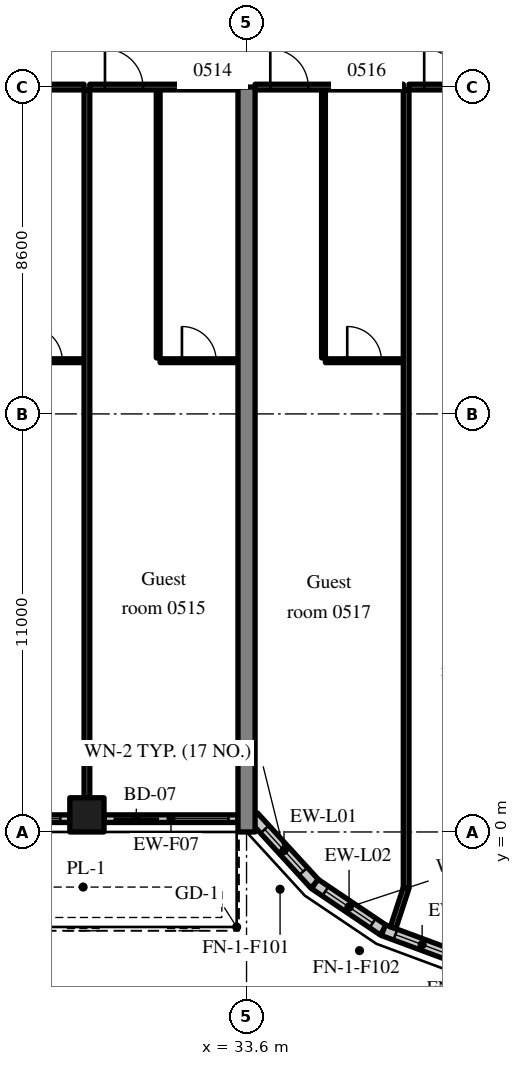
"""IFC4 building model, lengths in metres.
Left out: names, types, materials, properties, quantities, classifications, styles, units other than length and angle.
Written with IfcOpenShell. Run it as: python <this file> out.ifc"""

import sys

from ifc_helpers import new_model, si_unit, direction, frame, frame_2d, origin, origin_2d, place, context, subcontext, project, spatial, rectangle, extrude, source, transform, mapped, element, fill, save


model = new_model("IFC4")
c1 = context("Model", 3, precision=1e-05, world=origin(), true_north=direction((0.0, 1.0)))
c2 = subcontext(c1, "Body", "Model", "MODEL_VIEW")
j1 = project(units=[si_unit("LENGTHUNIT", "METRE"), si_unit("PLANEANGLEUNIT", "RADIAN")], contexts=[c1])
p1 = place(None, origin())
s1 = spatial("IfcSite", under=j1, at=p1, CompositionType="ELEMENT")
p2 = place(p1, origin())
s2 = spatial("IfcBuilding", under=s1, at=p2, CompositionType="ELEMENT")
p3 = place(p2, frame((0.0, 0.0, 27.8)))
s3 = spatial("IfcBuildingStorey", under=s2, at=p3, CompositionType="ELEMENT", Elevation=27.8)
m1 = source(origin(), c2, "Body", "SweptSolid", [
    extrude(rectangle(XDim=19.6, YDim=0.45, at=frame_2d((9.8, 0.0))), origin(), (0.0, 0.0, 1.0), 3.52),
])
p4 = place(p3, frame((33.6, 0.0, 0.0), z_axis=(0.0, 0.0, 1.0), x_axis=(0.0, 1.0, 0.0)))
e1 = element("IfcWall", 1, at=p4, inside=s3, PredefinedType="SHEAR", context=c2, shape_type="MappedRepresentation", body=[
    mapped(m1, transform((0.0, 0.0, 0.0), scale=1.0)),
])
m2 = source(origin(), c2, "Body", "SweptSolid", [
    extrude(rectangle(XDim=0.9, YDim=0.9, at=origin_2d()), origin(), (0.0, 0.0, 1.0), 3.52),
])
p5 = place(p3, frame((29.4, 0.45, 0.0), z_axis=(0.0, 0.0, 1.0), x_axis=(1.0, 0.0, 0.0)))
e2 = element("IfcColumn", 2, at=p5, inside=s3, PredefinedType="COLUMN", context=c2, shape_type="MappedRepresentation", body=[
    mapped(m2, transform((0.0, 0.0, 0.0), scale=1.0)),
])
m3 = source(origin(), c2, "Body", "SweptSolid", [
    extrude(rectangle(XDim=3.525, YDim=0.2, at=frame_2d((1.762, 0.0))), origin(), (0.0, 0.0, 1.0), 2.77),
])
p6 = place(p3, frame((25.425, 0.35, 0.0), z_axis=(0.0, 0.0, 1.0), x_axis=(1.0, 0.0, 0.0)))
e3 = element("IfcWall", 3, at=p6, inside=s3, PredefinedType="SOLIDWALL", context=c2, shape_type="MappedRepresentation", body=[
    mapped(m3, transform((0.0, 0.0, 0.0), scale=1.0)),
])
m4 = source(origin(), c2, "Body", "SweptSolid", [
    extrude(rectangle(XDim=1.2, YDim=2.4, at=frame_2d((0.6, 1.2))), frame((0.0, 0.11, 0.0), z_axis=(0.0, -1.0, 0.0), x_axis=(1.0, 0.0, 0.0)), (0.0, 0.0, 1.0), 0.22),
])
p7 = place(p6, frame((0.25, 0.0, 0.0)))
e4 = element("IfcOpeningElement", 4, at=p7, cuts=e3, PredefinedType="OPENING", context=c2, shape_type="MappedRepresentation", body=[
    mapped(m4, transform((0.0, 0.0, 0.0), scale=1.0)),
])
m5 = source(origin(), c2, "Body", "SweptSolid", [
    extrude(rectangle(XDim=1.5, YDim=1.5, at=frame_2d((0.75, 0.75))), frame((0.0, 0.11, 0.0), z_axis=(0.0, -1.0, 0.0), x_axis=(1.0, 0.0, 0.0)), (0.0, 0.0, 1.0), 0.22),
])
p8 = place(p6, frame((1.775, 0.0, 0.9)))
e5 = element("IfcOpeningElement", 5, at=p8, cuts=e3, PredefinedType="OPENING", context=c2, shape_type="MappedRepresentation", body=[
    mapped(m5, transform((0.0, 0.0, 0.0), scale=1.0)),
])
p9 = place(p3, frame((29.85, 0.35, 0.0), z_axis=(0.0, 0.0, 1.0), x_axis=(1.0, 0.0, 0.0)))
e6 = element("IfcWall", 6, at=p9, inside=s3, PredefinedType="SOLIDWALL", context=c2, shape_type="MappedRepresentation", body=[
    mapped(m3, transform((0.0, 0.0, 0.0), scale=1.0)),
])
p10 = place(p9, frame((0.25, 0.0, 0.0)))
e7 = element("IfcOpeningElement", 7, at=p10, cuts=e6, PredefinedType="OPENING", context=c2, shape_type="MappedRepresentation", body=[
    mapped(m4, transform((0.0, 0.0, 0.0), scale=1.0)),
])
p11 = place(p9, frame((1.775, 0.0, 0.9)))
e8 = element("IfcOpeningElement", 8, at=p11, cuts=e6, PredefinedType="OPENING", context=c2, shape_type="MappedRepresentation", body=[
    mapped(m5, transform((0.0, 0.0, 0.0), scale=1.0)),
])
m6 = source(origin(), c2, "Body", "SweptSolid", [
    extrude(rectangle(XDim=2.398, YDim=0.3, at=frame_2d((1.199, 0.0))), origin(), (0.0, 0.0, 1.0), 3.52),
])
p12 = place(p3, frame((33.776, 0.4, 0.0), z_axis=(0.0, 0.0, 1.0), x_axis=(0.675374189419, -0.737475222815, 0.0)))
e9 = element("IfcWall", 9, at=p12, inside=s3, PredefinedType="SOLIDWALL", context=c2, shape_type="MappedRepresentation", body=[
    mapped(m6, transform((0.0, 0.0, 0.0), scale=1.0)),
])
m7 = source(origin(), c2, "Body", "SweptSolid", [
    extrude(rectangle(XDim=1.5, YDim=2.0, at=frame_2d((0.75, 1.0))), frame((0.0, 0.16, 0.0), z_axis=(0.0, -1.0, 0.0), x_axis=(1.0, 0.0, 0.0)), (0.0, 0.0, 1.0), 0.32),
])
p13 = place(p12, frame((0.449, 0.0, 0.9)))
e10 = element("IfcOpeningElement", 10, at=p13, cuts=e9, PredefinedType="OPENING", context=c2, shape_type="MappedRepresentation", body=[
    mapped(m7, transform((0.0, 0.0, 0.0), scale=1.0)),
])
m8 = source(origin(), c2, "Body", "SweptSolid", [
    extrude(rectangle(XDim=2.176, YDim=0.3, at=frame_2d((1.088, 0.0))), origin(), (0.0, 0.0, 1.0), 3.52),
])
p14 = place(p3, frame((35.396, -1.369, 0.0), z_axis=(0.0, 0.0, 1.0), x_axis=(0.829590746428, -0.558371913192, 0.0)))
e11 = element("IfcWall", 11, at=p14, inside=s3, PredefinedType="SOLIDWALL", context=c2, shape_type="MappedRepresentation", body=[
    mapped(m8, transform((0.0, 0.0, 0.0), scale=1.0)),
])
p15 = place(p14, frame((0.338, 0.0, 0.9)))
e12 = element("IfcOpeningElement", 12, at=p15, cuts=e11, PredefinedType="OPENING", context=c2, shape_type="MappedRepresentation", body=[
    mapped(m7, transform((0.0, 0.0, 0.0), scale=1.0)),
])
p16 = place(p3, frame((37.201, -2.583, 0.0), z_axis=(0.0, 0.0, 1.0), x_axis=(0.93754555999, -0.347862505801, 0.0)))
e13 = element("IfcWall", 13, at=p16, inside=s3, PredefinedType="SOLIDWALL", context=c2, shape_type="MappedRepresentation", body=[
    mapped(m8, transform((0.0, 0.0, 0.0), scale=1.0)),
])
p17 = place(p16, frame((0.338, 0.0, 0.9)))
e14 = element("IfcOpeningElement", 14, at=p17, cuts=e13, PredefinedType="OPENING", context=c2, shape_type="MappedRepresentation", body=[
    mapped(m7, transform((0.0, 0.0, 0.0), scale=1.0)),
])
m9 = source(origin(), c2, "Body", "SweptSolid", [
    extrude(rectangle(XDim=2.05, YDim=0.1, at=frame_2d((1.025, 0.0))), origin(), (0.0, 0.0, 1.0), 3.52),
])
p18 = place(p3, frame((27.275, 12.4, 0.0), z_axis=(0.0, 0.0, 1.0), x_axis=(1.0, 0.0, 0.0)))
e15 = element("IfcWall", 15, at=p18, inside=s3, PredefinedType="PARTITIONING", context=c2, shape_type="MappedRepresentation", body=[
    mapped(m9, transform((0.0, 0.0, 0.0), scale=1.0)),
])
m10 = source(origin(), c2, "Body", "SweptSolid", [
    extrude(rectangle(XDim=0.9, YDim=2.1, at=frame_2d((0.45, 1.05))), frame((0.0, 0.06, 0.0), z_axis=(0.0, -1.0, 0.0), x_axis=(1.0, 0.0, 0.0)), (0.0, 0.0, 1.0), 0.12),
])
p19 = place(p18, frame((0.575, 0.0, 0.0)))
e16 = element("IfcOpeningElement", 16, at=p19, cuts=e15, PredefinedType="OPENING", context=c2, shape_type="MappedRepresentation", body=[
    mapped(m10, transform((0.0, 0.0, 0.0), scale=1.0)),
])
m11 = source(origin(), c2, "Body", "SweptSolid", [
    extrude(rectangle(XDim=3.9, YDim=0.15, at=frame_2d((1.95, 0.0))), origin(), (0.0, 0.0, 1.0), 2.82),
])
p20 = place(p3, frame((25.425, 19.6, 0.0), z_axis=(0.0, 0.0, 1.0), x_axis=(1.0, 0.0, 0.0)))
e17 = element("IfcWall", 17, at=p20, inside=s3, PredefinedType="PARTITIONING", context=c2, shape_type="MappedRepresentation", body=[
    mapped(m11, transform((0.0, 0.0, 0.0), scale=1.0)),
])
m12 = source(origin(), c2, "Body", "SweptSolid", [
    extrude(rectangle(XDim=1.0, YDim=2.1, at=frame_2d((0.5, 1.05))), frame((0.0, 0.085, 0.0), z_axis=(0.0, -1.0, 0.0), x_axis=(1.0, 0.0, 0.0)), (0.0, 0.0, 1.0), 0.17),
])
p21 = place(p20, frame((0.4, 0.0, 0.0)))
e18 = element("IfcOpeningElement", 18, at=p21, cuts=e17, PredefinedType="OPENING", context=c2, shape_type="MappedRepresentation", body=[
    mapped(m12, transform((0.0, 0.0, 0.0), scale=1.0)),
])
m13 = source(origin(), c2, "Body", "SweptSolid", [
    extrude(rectangle(XDim=7.05, YDim=0.1, at=frame_2d((3.525, 0.0))), origin(), (0.0, 0.0, 1.0), 3.52),
])
p22 = place(p3, frame((31.275, 12.475, 0.0), z_axis=(0.0, 0.0, 1.0), x_axis=(0.0, 1.0, 0.0)))
e19 = element("IfcWall", 19, at=p22, inside=s3, PredefinedType="PARTITIONING", context=c2, shape_type="MappedRepresentation", body=[
    mapped(m13, transform((0.0, 0.0, 0.0), scale=1.0)),
])
p23 = place(p3, frame((31.325, 12.4, 0.0), z_axis=(0.0, 0.0, 1.0), x_axis=(1.0, 0.0, 0.0)))
e20 = element("IfcWall", 20, at=p23, inside=s3, PredefinedType="PARTITIONING", context=c2, shape_type="MappedRepresentation", body=[
    mapped(m9, transform((0.0, 0.0, 0.0), scale=1.0)),
])
p24 = place(p23, frame((0.575, 0.0, 0.0)))
e21 = element("IfcOpeningElement", 21, at=p24, cuts=e20, PredefinedType="OPENING", context=c2, shape_type="MappedRepresentation", body=[
    mapped(m10, transform((0.0, 0.0, 0.0), scale=1.0)),
])
p25 = place(p3, frame((29.475, 19.6, 0.0), z_axis=(0.0, 0.0, 1.0), x_axis=(1.0, 0.0, 0.0)))
e22 = element("IfcWall", 22, at=p25, inside=s3, PredefinedType="PARTITIONING", context=c2, shape_type="MappedRepresentation", body=[
    mapped(m11, transform((0.0, 0.0, 0.0), scale=1.0)),
])
p26 = place(p25, frame((0.4, 0.0, 0.0)))
e23 = element("IfcOpeningElement", 23, at=p26, cuts=e22, PredefinedType="OPENING", context=c2, shape_type="MappedRepresentation", body=[
    mapped(m12, transform((0.0, 0.0, 0.0), scale=1.0)),
])
m14 = source(origin(), c2, "Body", "SweptSolid", [
    extrude(rectangle(XDim=18.625, YDim=0.15, at=frame_2d((9.312, 0.0))), origin(), (0.0, 0.0, 1.0), 3.52),
])
p27 = place(p3, frame((29.4, 0.9, 0.0), z_axis=(0.0, 0.0, 1.0), x_axis=(0.0, 1.0, 0.0)))
e24 = element("IfcWall", 24, at=p27, inside=s3, PredefinedType="PARTITIONING", context=c2, shape_type="MappedRepresentation", body=[
    mapped(m14, transform((0.0, 0.0, 0.0), scale=1.0)),
])
p28 = place(p3, frame((35.625, 12.475, 0.0), z_axis=(0.0, 0.0, 1.0), x_axis=(0.0, 1.0, 0.0)))
e25 = element("IfcWall", 25, at=p28, inside=s3, PredefinedType="PARTITIONING", context=c2, shape_type="MappedRepresentation", body=[
    mapped(m13, transform((0.0, 0.0, 0.0), scale=1.0)),
])
p29 = place(p3, frame((35.675, 12.4, 0.0), z_axis=(0.0, 0.0, 1.0), x_axis=(1.0, 0.0, 0.0)))
e26 = element("IfcWall", 26, at=p29, inside=s3, PredefinedType="PARTITIONING", context=c2, shape_type="MappedRepresentation", body=[
    mapped(m9, transform((0.0, 0.0, 0.0), scale=1.0)),
])
p30 = place(p29, frame((0.575, 0.0, 0.0)))
e27 = element("IfcOpeningElement", 27, at=p30, cuts=e26, PredefinedType="OPENING", context=c2, shape_type="MappedRepresentation", body=[
    mapped(m10, transform((0.0, 0.0, 0.0), scale=1.0)),
])
m15 = source(origin(), c2, "Body", "SweptSolid", [
    extrude(rectangle(XDim=3.9, YDim=0.15, at=frame_2d((1.95, 0.0))), origin(), (0.0, 0.0, 1.0), 2.82),
])
p31 = place(p3, frame((33.825, 19.6, 0.0), z_axis=(0.0, 0.0, 1.0), x_axis=(1.0, 0.0, 0.0)))
e28 = element("IfcWall", 28, at=p31, inside=s3, PredefinedType="PARTITIONING", context=c2, shape_type="MappedRepresentation", body=[
    mapped(m15, transform((0.0, 0.0, 0.0), scale=1.0)),
])
p32 = place(p31, frame((0.4, 0.0, 0.0)))
e29 = element("IfcOpeningElement", 29, at=p32, cuts=e28, PredefinedType="OPENING", context=c2, shape_type="MappedRepresentation", body=[
    mapped(m12, transform((0.0, 0.0, 0.0), scale=1.0)),
])
p33 = place(p3, frame((37.875, 19.6, 0.0), z_axis=(0.0, 0.0, 1.0), x_axis=(1.0, 0.0, 0.0)))
e30 = element("IfcWall", 30, at=p33, inside=s3, PredefinedType="PARTITIONING", context=c2, shape_type="MappedRepresentation", body=[
    mapped(m11, transform((0.0, 0.0, 0.0), scale=1.0)),
])
p34 = place(p33, frame((0.4, 0.0, 0.0)))
e31 = element("IfcOpeningElement", 31, at=p34, cuts=e30, PredefinedType="OPENING", context=c2, shape_type="MappedRepresentation", body=[
    mapped(m12, transform((0.0, 0.0, 0.0), scale=1.0)),
])
m16 = source(origin(), c2, "Body", "SweptSolid", [
    extrude(rectangle(XDim=20.998, YDim=0.15, at=frame_2d((10.499, 0.0))), origin(), (0.0, 0.0, 1.0), 3.52),
])
p35 = place(p3, frame((37.8, -1.473, 0.0), z_axis=(0.0, 0.0, 1.0), x_axis=(0.0, 1.0, 0.0)))
e32 = element("IfcWall", 32, at=p35, inside=s3, PredefinedType="PARTITIONING", context=c2, shape_type="MappedRepresentation", body=[
    mapped(m16, transform((0.0, 0.0, 0.0), scale=1.0)),
])
m17 = source(origin(), c2, "Body", "SweptSolid", [
    extrude(rectangle(XDim=1.101, YDim=0.15, at=frame_2d((0.55, 0.0))), origin(), (0.0, 0.0, 1.0), 3.52),
])
p36 = place(p3, frame((37.457, -2.519, 0.0), z_axis=(0.0, 0.0, 1.0), x_axis=(0.311567081539, 0.950224159712, 0.0)))
e33 = element("IfcWall", 33, at=p36, inside=s3, PredefinedType="PARTITIONING", context=c2, shape_type="MappedRepresentation", body=[
    mapped(m17, transform((0.0, 0.0, 0.0), scale=1.0)),
])
m18 = source(origin(), c2, "Body", "SweptSolid", [
    extrude(rectangle(XDim=1.5, YDim=1.5, at=frame_2d((0.75, 0.75))), frame((0.0, 0.03, 0.0), z_axis=(0.0, -1.0, 0.0), x_axis=(1.0, 0.0, 0.0)), (0.0, 0.0, 1.0), 0.06),
])
p37 = place(p8, origin())
e34 = element("IfcWindow", 34, at=p37, inside=s3, PartitioningType="SINGLE_PANEL", PredefinedType="WINDOW", context=c2, shape_type="MappedRepresentation", body=[
    mapped(m18, transform((0.0, 0.0, 0.0), scale=1.0)),
])
fill(e5, e34)
m19 = source(origin(), c2, "Body", "SweptSolid", [
    extrude(rectangle(XDim=1.2, YDim=2.4, at=frame_2d((0.6, 1.2))), frame((0.0, 0.025, 0.0), z_axis=(0.0, -1.0, 0.0), x_axis=(1.0, 0.0, 0.0)), (0.0, 0.0, 1.0), 0.05),
])
p38 = place(p10, origin())
e35 = element("IfcDoor", 35, at=p38, inside=s3, OperationType="SLIDING_TO_LEFT", PredefinedType="DOOR", context=c2, shape_type="MappedRepresentation", body=[
    mapped(m19, transform((0.0, 0.0, 0.0), scale=1.0)),
])
fill(e7, e35)
p39 = place(p11, origin())
e36 = element("IfcWindow", 36, at=p39, inside=s3, PartitioningType="SINGLE_PANEL", PredefinedType="WINDOW", context=c2, shape_type="MappedRepresentation", body=[
    mapped(m18, transform((0.0, 0.0, 0.0), scale=1.0)),
])
fill(e8, e36)
m20 = source(origin(), c2, "Body", "SweptSolid", [
    extrude(rectangle(XDim=1.5, YDim=2.0, at=frame_2d((0.75, 1.0))), frame((0.0, 0.03, 0.0), z_axis=(0.0, -1.0, 0.0), x_axis=(1.0, 0.0, 0.0)), (0.0, 0.0, 1.0), 0.06),
])
p40 = place(p13, origin())
e37 = element("IfcWindow", 37, at=p40, inside=s3, PartitioningType="SINGLE_PANEL", PredefinedType="WINDOW", context=c2, shape_type="MappedRepresentation", body=[
    mapped(m20, transform((0.0, 0.0, 0.0), scale=1.0)),
])
fill(e10, e37)
p41 = place(p15, origin())
e38 = element("IfcWindow", 38, at=p41, inside=s3, PartitioningType="SINGLE_PANEL", PredefinedType="WINDOW", context=c2, shape_type="MappedRepresentation", body=[
    mapped(m20, transform((0.0, 0.0, 0.0), scale=1.0)),
])
fill(e12, e38)
p42 = place(p17, origin())
e39 = element("IfcWindow", 39, at=p42, inside=s3, PartitioningType="SINGLE_PANEL", PredefinedType="WINDOW", context=c2, shape_type="MappedRepresentation", body=[
    mapped(m20, transform((0.0, 0.0, 0.0), scale=1.0)),
])
fill(e14, e39)
m21 = source(origin(), c2, "Body", "SweptSolid", [
    extrude(rectangle(XDim=0.9, YDim=2.1, at=frame_2d((0.45, 1.05))), frame((0.0, 0.025, 0.0), z_axis=(0.0, -1.0, 0.0), x_axis=(1.0, 0.0, 0.0)), (0.0, 0.0, 1.0), 0.05),
])
p43 = place(p19, origin())
e40 = element("IfcDoor", 40, at=p43, inside=s3, OperationType="SINGLE_SWING_LEFT", PredefinedType="DOOR", context=c2, shape_type="MappedRepresentation", body=[
    mapped(m21, transform((0.0, 0.0, 0.0), scale=1.0)),
])
fill(e16, e40)
p44 = place(p24, origin())
e41 = element("IfcDoor", 41, at=p44, inside=s3, OperationType="SINGLE_SWING_LEFT", PredefinedType="DOOR", context=c2, shape_type="MappedRepresentation", body=[
    mapped(m21, transform((0.0, 0.0, 0.0), scale=1.0)),
])
fill(e21, e41)
m22 = source(origin(), c2, "Body", "SweptSolid", [
    extrude(rectangle(XDim=1.0, YDim=2.1, at=frame_2d((0.5, 1.05))), frame((0.0, 0.025, 0.0), z_axis=(0.0, -1.0, 0.0), x_axis=(1.0, 0.0, 0.0)), (0.0, 0.0, 1.0), 0.05),
])
p45 = place(p26, origin())
e42 = element("IfcDoor", 42, at=p45, inside=s3, OperationType="SINGLE_SWING_LEFT", PredefinedType="DOOR", context=c2, shape_type="MappedRepresentation", body=[
    mapped(m22, transform((0.0, 0.0, 0.0), scale=1.0)),
])
fill(e23, e42)
p46 = place(p30, origin())
e43 = element("IfcDoor", 43, at=p46, inside=s3, OperationType="SINGLE_SWING_LEFT", PredefinedType="DOOR", context=c2, shape_type="MappedRepresentation", body=[
    mapped(m21, transform((0.0, 0.0, 0.0), scale=1.0)),
])
fill(e27, e43)
p47 = place(p32, origin())
e44 = element("IfcDoor", 44, at=p47, inside=s3, OperationType="SINGLE_SWING_LEFT", PredefinedType="DOOR", context=c2, shape_type="MappedRepresentation", body=[
    mapped(m22, transform((0.0, 0.0, 0.0), scale=1.0)),
])
fill(e29, e44)
p48 = place(p34, origin())
e45 = element("IfcDoor", 45, at=p48, inside=s3, OperationType="SINGLE_SWING_LEFT", PredefinedType="DOOR", context=c2, shape_type="MappedRepresentation", body=[
    mapped(m22, transform((0.0, 0.0, 0.0), scale=1.0)),
])
fill(e31, e45)
save(model, sys.argv[1])
